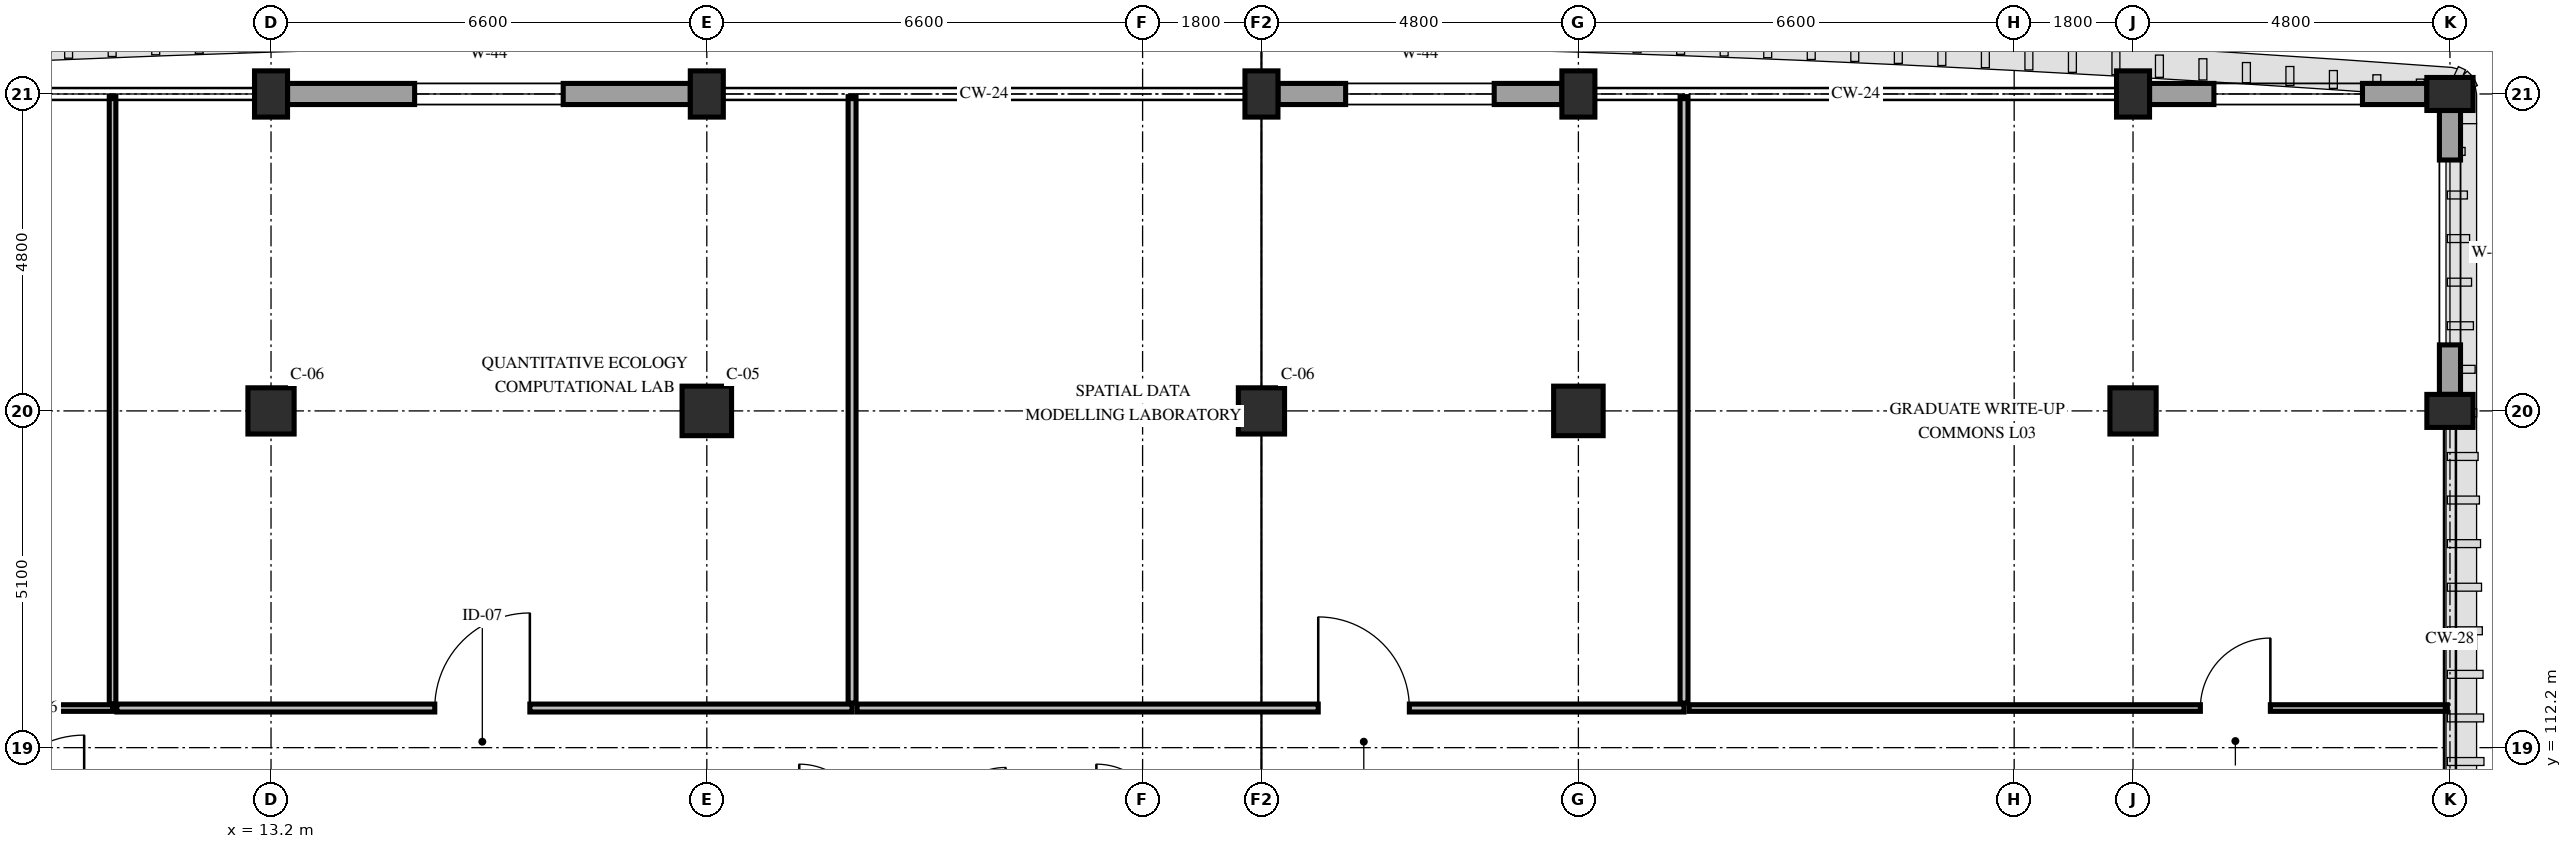
"""IFC4 building model, lengths in metres.
Left out: names, types, materials, properties, quantities, classifications, styles, units other than length and angle.
Written with IfcOpenShell. Run it as: python <this file> out.ifc"""

import sys

from ifc_helpers import new_model, si_unit, direction, frame, frame_2d, origin, origin_2d, place, context, subcontext, project, spatial, rectangle, extrude, element, fill, save


model = new_model("IFC4")
c1 = context("Model", 3, precision=1e-05, world=origin(), true_north=direction((0.0, 1.0)))
c2 = subcontext(c1, "Body", "Model", "MODEL_VIEW")
j1 = project(units=[si_unit("LENGTHUNIT", "METRE"), si_unit("PLANEANGLEUNIT", "RADIAN")], contexts=[c1])
p1 = place(None, origin())
s1 = spatial("IfcSite", under=j1, at=p1, CompositionType="ELEMENT")
p2 = place(p1, origin())
s2 = spatial("IfcBuilding", under=s1, at=p2, CompositionType="ELEMENT")
p3 = place(p2, frame((0.0, 0.0, 15.0)))
s3 = spatial("IfcBuildingStorey", under=s2, at=p3, CompositionType="ELEMENT", Elevation=15.0)
p4 = place(p3, frame((13.2, 117.3, 0.0), z_axis=(0.0, 0.0, 1.0), x_axis=(1.0, 0.0, 0.0)))
e1 = element("IfcColumn", 1, at=p4, inside=s3, PredefinedType="COLUMN", context=c2, shape_type="SweptSolid", body=[
    extrude(rectangle(XDim=0.7, YDim=0.7, at=origin_2d()), origin(), (0.0, 0.0, 1.0), 4.8),
])
p5 = place(p3, frame((13.2, 122.1, 0.0), z_axis=(0.0, 0.0, 1.0), x_axis=(1.0, 0.0, 0.0)))
e2 = element("IfcColumn", 2, at=p5, inside=s3, PredefinedType="PILASTER", context=c2, shape_type="SweptSolid", body=[
    extrude(rectangle(XDim=0.5, YDim=0.7, at=origin_2d()), origin(), (0.0, 0.0, 1.0), 4.8),
])
p6 = place(p3, frame((19.8, 117.3, 0.0), z_axis=(0.0, 0.0, 1.0), x_axis=(1.0, 0.0, 0.0)))
e3 = element("IfcColumn", 3, at=p6, inside=s3, PredefinedType="COLUMN", context=c2, shape_type="SweptSolid", body=[
    extrude(rectangle(XDim=0.75, YDim=0.75, at=origin_2d()), origin(), (0.0, 0.0, 1.0), 4.8),
])
p7 = place(p3, frame((19.8, 122.1, 0.0), z_axis=(0.0, 0.0, 1.0), x_axis=(1.0, 0.0, 0.0)))
e4 = element("IfcColumn", 4, at=p7, inside=s3, PredefinedType="PILASTER", context=c2, shape_type="SweptSolid", body=[
    extrude(rectangle(XDim=0.5, YDim=0.7, at=origin_2d()), origin(), (0.0, 0.0, 1.0), 4.8),
])
p8 = place(p3, frame((28.2, 117.3, 0.0), z_axis=(0.0, 0.0, 1.0), x_axis=(1.0, 0.0, 0.0)))
e5 = element("IfcColumn", 5, at=p8, inside=s3, PredefinedType="COLUMN", context=c2, shape_type="SweptSolid", body=[
    extrude(rectangle(XDim=0.7, YDim=0.7, at=origin_2d()), origin(), (0.0, 0.0, 1.0), 4.8),
])
p9 = place(p3, frame((28.2, 122.1, 0.0), z_axis=(0.0, 0.0, 1.0), x_axis=(1.0, 0.0, 0.0)))
e6 = element("IfcColumn", 6, at=p9, inside=s3, PredefinedType="PILASTER", context=c2, shape_type="SweptSolid", body=[
    extrude(rectangle(XDim=0.5, YDim=0.7, at=origin_2d()), origin(), (0.0, 0.0, 1.0), 4.8),
])
p10 = place(p3, frame((33.0, 117.3, 0.0), z_axis=(0.0, 0.0, 1.0), x_axis=(1.0, 0.0, 0.0)))
e7 = element("IfcColumn", 7, at=p10, inside=s3, PredefinedType="COLUMN", context=c2, shape_type="SweptSolid", body=[
    extrude(rectangle(XDim=0.75, YDim=0.75, at=origin_2d()), origin(), (0.0, 0.0, 1.0), 4.8),
])
p11 = place(p3, frame((33.0, 122.1, 0.0), z_axis=(0.0, 0.0, 1.0), x_axis=(1.0, 0.0, 0.0)))
e8 = element("IfcColumn", 8, at=p11, inside=s3, PredefinedType="PILASTER", context=c2, shape_type="SweptSolid", body=[
    extrude(rectangle(XDim=0.5, YDim=0.7, at=origin_2d()), origin(), (0.0, 0.0, 1.0), 4.8),
])
p12 = place(p3, frame((41.4, 117.3, 0.0), z_axis=(0.0, 0.0, 1.0), x_axis=(1.0, 0.0, 0.0)))
e9 = element("IfcColumn", 9, at=p12, inside=s3, PredefinedType="COLUMN", context=c2, shape_type="SweptSolid", body=[
    extrude(rectangle(XDim=0.7, YDim=0.7, at=origin_2d()), origin(), (0.0, 0.0, 1.0), 4.8),
])
for number, where, z_axis, x_axis in (
    (10, (41.4, 122.1, 0.0), (0.0, 0.0, 1.0), (1.0, 0.0, 0.0)),
    (11, (46.2, 117.3, 0.0), (0.0, 0.0, 1.0), (0.0, 1.0, 0.0)),
    (12, (46.2, 122.1, 0.0), (0.0, 0.0, 1.0), (0.0, 1.0, 0.0)),
):
    element("IfcColumn", number, at=place(p3, frame(where, z_axis=z_axis, x_axis=x_axis)), inside=s3, PredefinedType="PILASTER", context=c2, shape_type="SweptSolid", body=[
        extrude(rectangle(XDim=0.5, YDim=0.7, at=origin_2d()), origin(), (0.0, 0.0, 1.0), 4.8),
    ])
p13 = place(p3, frame((13.45, 122.1, 0.0), z_axis=(0.0, 0.0, 1.0), x_axis=(1.0, 0.0, 0.0)))
e13 = element("IfcWall", 13, at=p13, inside=s3, PredefinedType="STANDARD", context=c2, shape_type="SweptSolid", body=[
    extrude(rectangle(XDim=6.1, YDim=0.32, at=frame_2d((3.05, 0.0))), origin(), (0.0, 0.0, 1.0), 3.93),
])
p14 = place(p13, frame((1.925, 0.0, 0.85)))
e14 = element("IfcOpeningElement", 14, at=p14, cuts=e13, PredefinedType="OPENING", context=c2, shape_type="SweptSolid", body=[
    extrude(rectangle(XDim=2.25, YDim=2.24, at=frame_2d((1.125, 1.12))), frame((0.0, 0.175, 0.0), z_axis=(0.0, -1.0, 0.0), x_axis=(1.0, 0.0, 0.0)), (0.0, 0.0, 1.0), 0.35),
])
p15 = place(p3, frame((28.45, 122.1, 0.0), z_axis=(0.0, 0.0, 1.0), x_axis=(1.0, 0.0, 0.0)))
e15 = element("IfcWall", 15, at=p15, inside=s3, PredefinedType="STANDARD", context=c2, shape_type="SweptSolid", body=[
    extrude(rectangle(XDim=4.3, YDim=0.32, at=frame_2d((2.15, 0.0))), origin(), (0.0, 0.0, 1.0), 3.95),
])
p16 = place(p15, frame((1.025, 0.0, 0.85)))
e16 = element("IfcOpeningElement", 16, at=p16, cuts=e15, PredefinedType="OPENING", context=c2, shape_type="SweptSolid", body=[
    extrude(rectangle(XDim=2.25, YDim=2.24, at=frame_2d((1.125, 1.12))), frame((0.0, 0.175, 0.0), z_axis=(0.0, -1.0, 0.0), x_axis=(1.0, 0.0, 0.0)), (0.0, 0.0, 1.0), 0.35),
])
p17 = place(p3, frame((41.65, 122.1, 0.0), z_axis=(0.0, 0.0, 1.0), x_axis=(1.0, 0.0, 0.0)))
e17 = element("IfcWall", 17, at=p17, inside=s3, PredefinedType="STANDARD", context=c2, shape_type="SweptSolid", body=[
    extrude(rectangle(XDim=4.2, YDim=0.32, at=frame_2d((2.1, 0.0))), origin(), (0.0, 0.0, 1.0), 3.95),
])
p18 = place(p17, frame((0.975, 0.0, 0.85)))
e18 = element("IfcOpeningElement", 18, at=p18, cuts=e17, PredefinedType="OPENING", context=c2, shape_type="SweptSolid", body=[
    extrude(rectangle(XDim=2.25, YDim=2.24, at=frame_2d((1.125, 1.12))), frame((0.0, 0.175, 0.0), z_axis=(0.0, -1.0, 0.0), x_axis=(1.0, 0.0, 0.0)), (0.0, 0.0, 1.0), 0.35),
])
p19 = place(p3, frame((46.2, 121.85, 0.0), z_axis=(0.0, 0.0, 1.0), x_axis=(0.0, -1.0, 0.0)))
e19 = element("IfcWall", 19, at=p19, inside=s3, PredefinedType="STANDARD", context=c2, shape_type="SweptSolid", body=[
    extrude(rectangle(XDim=4.3, YDim=0.32, at=frame_2d((2.15, 0.0))), origin(), (0.0, 0.0, 1.0), 3.95),
])
p20 = place(p19, frame((0.75, 0.0, 0.85)))
e20 = element("IfcOpeningElement", 20, at=p20, cuts=e19, PredefinedType="OPENING", context=c2, shape_type="SweptSolid", body=[
    extrude(rectangle(XDim=2.8, YDim=2.08, at=frame_2d((1.4, 1.04))), frame((0.0, 0.175, 0.0), z_axis=(0.0, -1.0, 0.0), x_axis=(1.0, 0.0, 0.0)), (0.0, 0.0, 1.0), 0.35),
])
p21 = place(p3, frame((4.865, 112.8, 0.0), z_axis=(0.0, 0.0, 1.0), x_axis=(1.0, 0.0, 0.0)))
e21 = element("IfcWall", 21, at=p21, inside=s3, PredefinedType="PARTITIONING", context=c2, shape_type="SweptSolid", body=[
    extrude(rectangle(XDim=5.935, YDim=0.1, at=frame_2d((2.968, 0.0))), origin(), (0.0, 0.0, 1.0), 4.13),
])
p22 = place(p21, frame((2.455, 0.0, 0.0)))
e22 = element("IfcOpeningElement", 22, at=p22, cuts=e21, PredefinedType="OPENING", context=c2, shape_type="SweptSolid", body=[
    extrude(rectangle(XDim=0.96, YDim=2.15, at=frame_2d((0.48, 1.075))), frame((0.0, 0.065, 0.0), z_axis=(0.0, -1.0, 0.0), x_axis=(1.0, 0.0, 0.0)), (0.0, 0.0, 1.0), 0.13),
])
p23 = place(p3, frame((10.8, 112.865, 0.0), z_axis=(0.0, 0.0, 1.0), x_axis=(0.0, 1.0, 0.0)))
e23 = element("IfcWall", 23, at=p23, inside=s3, PredefinedType="PARTITIONING", context=c2, shape_type="SweptSolid", body=[
    extrude(rectangle(XDim=9.195, YDim=0.1, at=frame_2d((4.598, 0.0))), origin(), (0.0, 0.0, 1.0), 3.83),
])
p24 = place(p3, frame((10.865, 112.8, 0.0), z_axis=(0.0, 0.0, 1.0), x_axis=(1.0, 0.0, 0.0)))
e24 = element("IfcWall", 24, at=p24, inside=s3, PredefinedType="PARTITIONING", context=c2, shape_type="SweptSolid", body=[
    extrude(rectangle(XDim=11.135, YDim=0.12, at=frame_2d((5.567, 0.0))), origin(), (0.0, 0.0, 1.0), 4.13),
])
p25 = place(p24, frame((4.815, 0.0, 0.0)))
e25 = element("IfcOpeningElement", 25, at=p25, cuts=e24, PredefinedType="OPENING", context=c2, shape_type="SweptSolid", body=[
    extrude(rectangle(XDim=1.44, YDim=2.25, at=frame_2d((0.72, 1.125))), frame((0.0, 0.075, 0.0), z_axis=(0.0, -1.0, 0.0), x_axis=(1.0, 0.0, 0.0)), (0.0, 0.0, 1.0), 0.15),
])
p26 = place(p3, frame((22.0, 112.875, 0.0), z_axis=(0.0, 0.0, 1.0), x_axis=(0.0, 1.0, 0.0)))
e26 = element("IfcWall", 26, at=p26, inside=s3, PredefinedType="PARTITIONING", context=c2, shape_type="SweptSolid", body=[
    extrude(rectangle(XDim=9.185, YDim=0.12, at=frame_2d((4.593, 0.0))), origin(), (0.0, 0.0, 1.0), 3.83),
])
p27 = place(p3, frame((22.075, 112.8, 0.0), z_axis=(0.0, 0.0, 1.0), x_axis=(1.0, 0.0, 0.0)))
e27 = element("IfcWall", 27, at=p27, inside=s3, PredefinedType="PARTITIONING", context=c2, shape_type="SweptSolid", body=[
    extrude(rectangle(XDim=12.525, YDim=0.12, at=frame_2d((6.263, 0.0))), origin(), (0.0, 0.0, 1.0), 4.13),
])
p28 = place(p27, frame((6.985, 0.0, 0.0)))
e28 = element("IfcOpeningElement", 28, at=p28, cuts=e27, PredefinedType="OPENING", context=c2, shape_type="SweptSolid", body=[
    extrude(rectangle(XDim=1.38, YDim=2.25, at=frame_2d((0.69, 1.125))), frame((0.0, 0.075, 0.0), z_axis=(0.0, -1.0, 0.0), x_axis=(1.0, 0.0, 0.0)), (0.0, 0.0, 1.0), 0.15),
])
p29 = place(p3, frame((34.6, 112.875, 0.0), z_axis=(0.0, 0.0, 1.0), x_axis=(0.0, 1.0, 0.0)))
e29 = element("IfcWall", 29, at=p29, inside=s3, PredefinedType="PARTITIONING", context=c2, shape_type="SweptSolid", body=[
    extrude(rectangle(XDim=9.185, YDim=0.12, at=frame_2d((4.593, 0.0))), origin(), (0.0, 0.0, 1.0), 3.83),
])
p30 = place(p3, frame((34.675, 112.8, 0.0), z_axis=(0.0, 0.0, 1.0), x_axis=(1.0, 0.0, 0.0)))
e30 = element("IfcWall", 30, at=p30, inside=s3, PredefinedType="PARTITIONING", context=c2, shape_type="SweptSolid", body=[
    extrude(rectangle(XDim=11.485, YDim=0.1, at=frame_2d((5.742, 0.0))), origin(), (0.0, 0.0, 1.0), 4.08),
])
p31 = place(p30, frame((7.745, 0.0, 0.0)))
e31 = element("IfcOpeningElement", 31, at=p31, cuts=e30, PredefinedType="OPENING", context=c2, shape_type="SweptSolid", body=[
    extrude(rectangle(XDim=1.06, YDim=2.2, at=frame_2d((0.53, 1.1))), frame((0.0, 0.065, 0.0), z_axis=(0.0, -1.0, 0.0), x_axis=(1.0, 0.0, 0.0)), (0.0, 0.0, 1.0), 0.13),
])
p32 = place(p14, origin())
e32 = element("IfcWindow", 32, at=p32, inside=s3, PartitioningType="DOUBLE_PANEL_VERTICAL", PredefinedType="WINDOW", context=c2, shape_type="SweptSolid", body=[
    extrude(rectangle(XDim=2.25, YDim=2.24, at=frame_2d((1.125, 1.12))), frame((0.0, 0.03, 0.0), z_axis=(0.0, -1.0, 0.0), x_axis=(1.0, 0.0, 0.0)), (0.0, 0.0, 1.0), 0.06),
])
fill(e14, e32)
p33 = place(p16, origin())
e33 = element("IfcWindow", 33, at=p33, inside=s3, PartitioningType="DOUBLE_PANEL_VERTICAL", PredefinedType="WINDOW", context=c2, shape_type="SweptSolid", body=[
    extrude(rectangle(XDim=2.25, YDim=2.24, at=frame_2d((1.125, 1.12))), frame((0.0, 0.03, 0.0), z_axis=(0.0, -1.0, 0.0), x_axis=(1.0, 0.0, 0.0)), (0.0, 0.0, 1.0), 0.06),
])
fill(e16, e33)
p34 = place(p18, origin())
e34 = element("IfcWindow", 34, at=p34, inside=s3, PartitioningType="DOUBLE_PANEL_VERTICAL", PredefinedType="WINDOW", context=c2, shape_type="SweptSolid", body=[
    extrude(rectangle(XDim=2.25, YDim=2.24, at=frame_2d((1.125, 1.12))), frame((0.0, 0.03, 0.0), z_axis=(0.0, -1.0, 0.0), x_axis=(1.0, 0.0, 0.0)), (0.0, 0.0, 1.0), 0.06),
])
fill(e18, e34)
p35 = place(p20, origin())
e35 = element("IfcWindow", 35, at=p35, inside=s3, PartitioningType="DOUBLE_PANEL_VERTICAL", PredefinedType="WINDOW", context=c2, shape_type="SweptSolid", body=[
    extrude(rectangle(XDim=2.8, YDim=2.08, at=frame_2d((1.4, 1.04))), frame((0.0, 0.03, 0.0), z_axis=(0.0, -1.0, 0.0), x_axis=(1.0, 0.0, 0.0)), (0.0, 0.0, 1.0), 0.06),
])
fill(e20, e35)
p36 = place(p25, origin())
e36 = element("IfcDoor", 36, at=p36, inside=s3, OperationType="SINGLE_SWING_RIGHT", PredefinedType="DOOR", context=c2, shape_type="SweptSolid", body=[
    extrude(rectangle(XDim=1.44, YDim=2.25, at=frame_2d((0.72, 1.125))), frame((0.0, 0.025, 0.0), z_axis=(0.0, -1.0, 0.0), x_axis=(1.0, 0.0, 0.0)), (0.0, 0.0, 1.0), 0.05),
])
fill(e25, e36)
p37 = place(p28, origin())
e37 = element("IfcDoor", 37, at=p37, inside=s3, OperationType="SINGLE_SWING_LEFT", PredefinedType="DOOR", context=c2, shape_type="SweptSolid", body=[
    extrude(rectangle(XDim=1.38, YDim=2.25, at=frame_2d((0.69, 1.125))), frame((0.0, 0.025, 0.0), z_axis=(0.0, -1.0, 0.0), x_axis=(1.0, 0.0, 0.0)), (0.0, 0.0, 1.0), 0.05),
])
fill(e28, e37)
p38 = place(p31, origin())
e38 = element("IfcDoor", 38, at=p38, inside=s3, OperationType="SINGLE_SWING_RIGHT", PredefinedType="DOOR", context=c2, shape_type="SweptSolid", body=[
    extrude(rectangle(XDim=1.06, YDim=2.2, at=frame_2d((0.53, 1.1))), frame((0.0, 0.025, 0.0), z_axis=(0.0, -1.0, 0.0), x_axis=(1.0, 0.0, 0.0)), (0.0, 0.0, 1.0), 0.05),
])
fill(e31, e38)
save(model, sys.argv[1])
